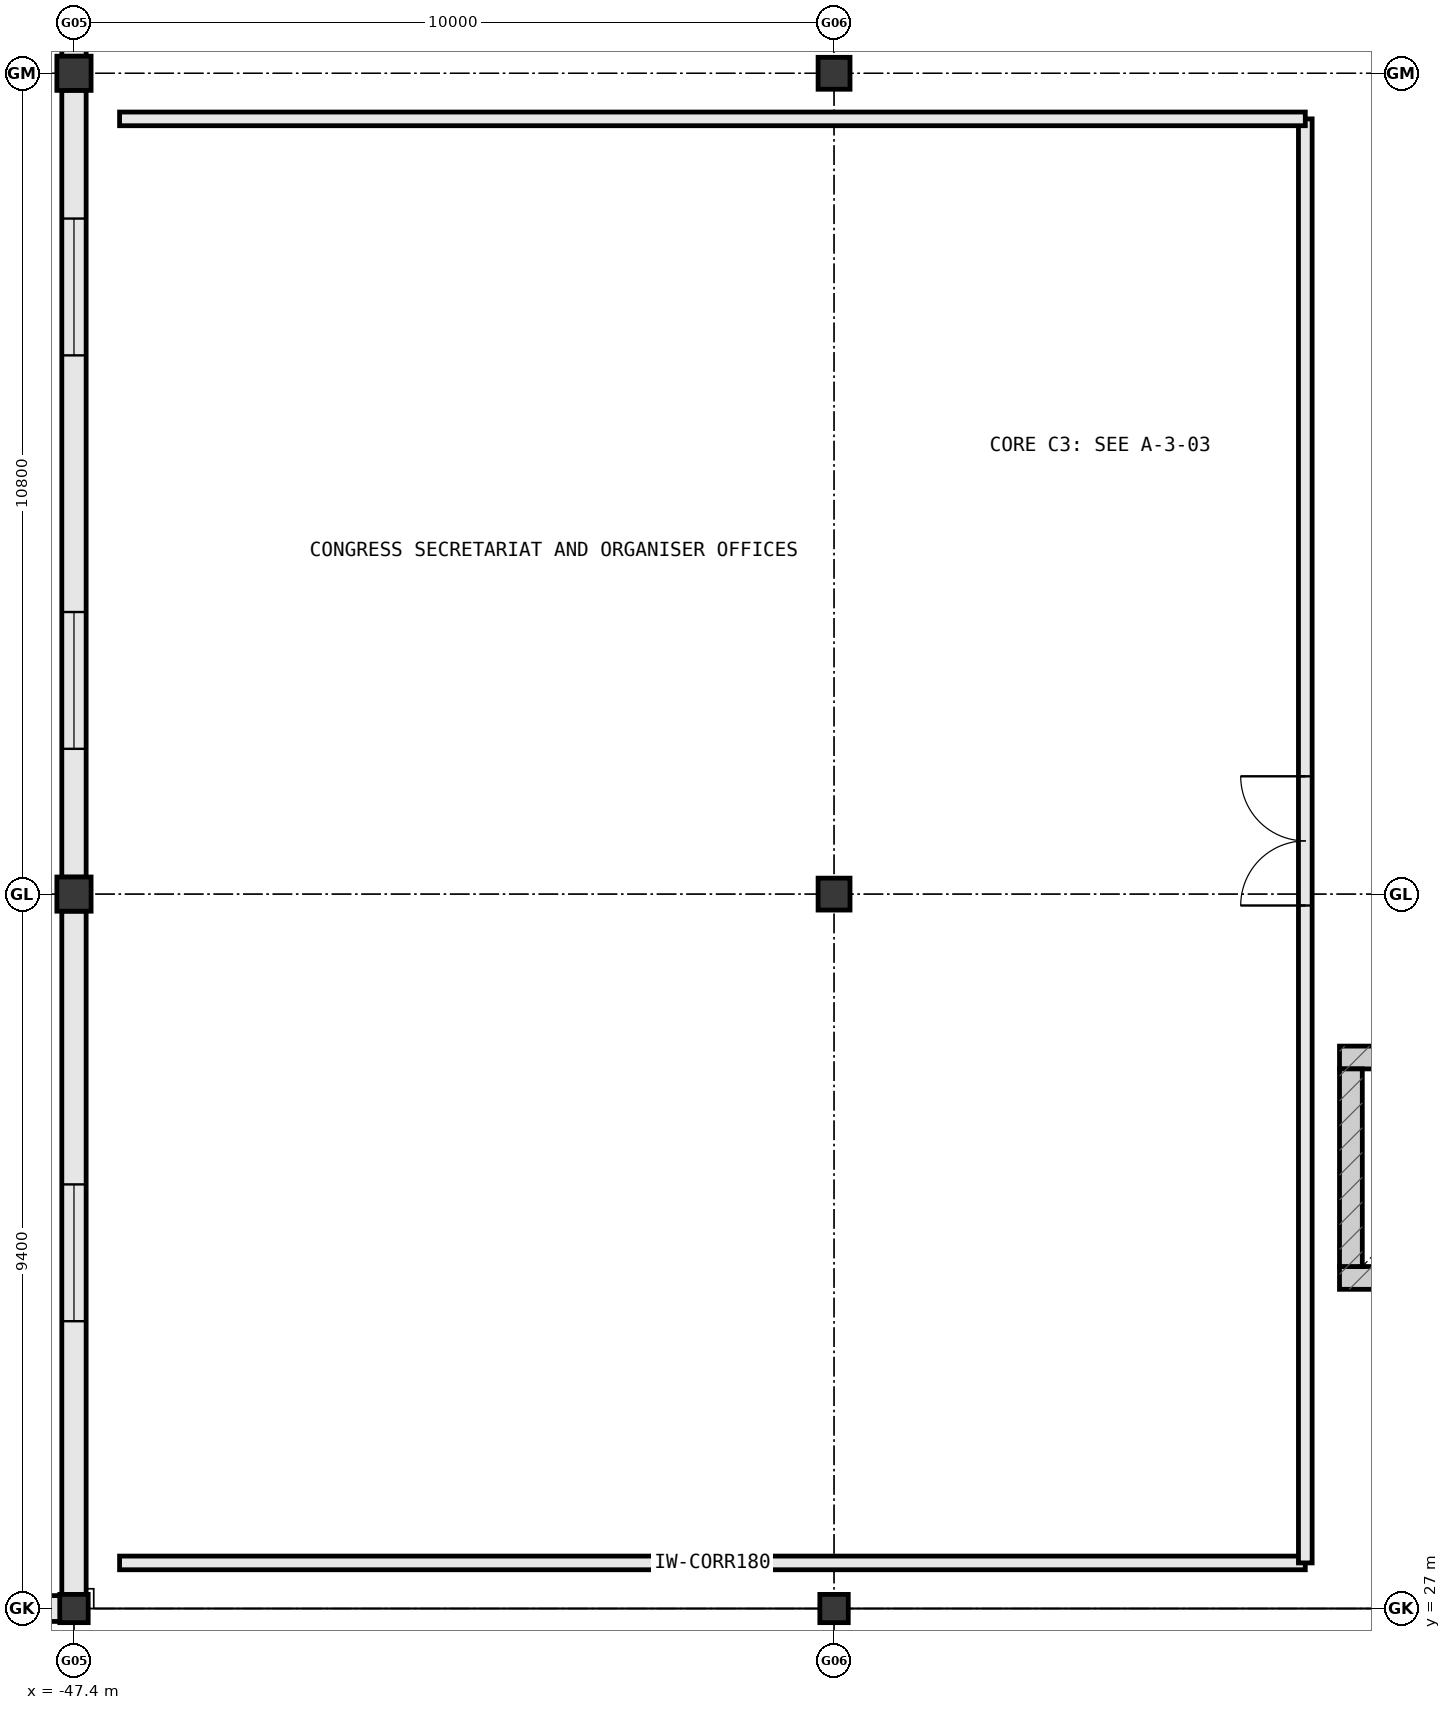
"""IFC4 building model, lengths in metres.
Left out: names, types, materials, properties, quantities, classifications, styles, units other than length and angle.
Written with IfcOpenShell. Run it as: python <this file> out.ifc"""

import sys

from ifc_helpers import new_model, si_unit, direction, frame, frame_2d, origin, origin_2d, place, context, subcontext, project, spatial, rectangle, i_section, extrude, element, fill, save


model = new_model("IFC4")
c1 = context("Model", 3, precision=1e-05, world=origin(), true_north=direction((0.0, 1.0)))
c2 = subcontext(c1, "Body", "Model", "MODEL_VIEW")
j1 = project(units=[si_unit("LENGTHUNIT", "METRE"), si_unit("PLANEANGLEUNIT", "RADIAN")], contexts=[c1])
p1 = place(None, origin())
s1 = spatial("IfcSite", under=j1, at=p1, CompositionType="ELEMENT")
p2 = place(p1, origin())
s2 = spatial("IfcBuilding", under=s1, at=p2, CompositionType="ELEMENT")
p3 = place(p2, frame((0.0, 0.0, 10.8)))
s3 = spatial("IfcBuildingStorey", under=s2, at=p3, CompositionType="ELEMENT", Elevation=10.8)
for number, where, z_axis, x_axis in (
    (1, (-47.4, 27.0, 0.0), (0.0, 0.0, 1.0), (1.0, 0.0, 0.0)),
    (2, (-37.4, 27.0, 0.0), (0.0, 0.0, 1.0), (1.0, 0.0, 0.0)),
):
    element("IfcColumn", number, at=place(p3, frame(where, z_axis=z_axis, x_axis=x_axis)), inside=s3, PredefinedType="COLUMN", context=c2, shape_type="SweptSolid", body=[
        extrude(i_section(OverallWidth=0.374, OverallDepth=0.372, WebThickness=0.016, FlangeThickness=0.026, at=origin_2d()), origin(), (0.0, 0.0, 1.0), 5.4),
    ])
for number, where, z_axis, x_axis in (
    (3, (-47.4, 36.4, 0.0), (0.0, 0.0, 1.0), (1.0, 0.0, 0.0)),
    (4, (-47.4, 47.2, 0.0), (0.0, 0.0, 1.0), (1.0, 0.0, 0.0)),
):
    element("IfcColumn", number, at=place(p3, frame(where, z_axis=z_axis, x_axis=x_axis)), inside=s3, PredefinedType="COLUMN", context=c2, shape_type="SweptSolid", body=[
        extrude(rectangle(XDim=0.45, YDim=0.45, at=origin_2d()), origin(), (0.0, 0.0, 1.0), 5.4),
    ])
for number, where, z_axis, x_axis in (
    (5, (-37.4, 36.4, 0.0), (0.0, 0.0, 1.0), (1.0, 0.0, 0.0)),
    (6, (-37.4, 47.2, 0.0), (0.0, 0.0, 1.0), (1.0, 0.0, 0.0)),
):
    element("IfcColumn", number, at=place(p3, frame(where, z_axis=z_axis, x_axis=x_axis)), inside=s3, PredefinedType="COLUMN", context=c2, shape_type="SweptSolid", body=[
        extrude(rectangle(XDim=0.42, YDim=0.42, at=origin_2d()), origin(), (0.0, 0.0, 1.0), 5.4),
    ])
p4 = place(p3, frame((-47.406, 27.0, 0.0), z_axis=(0.0, 0.0, 1.0), x_axis=(-1.0, 0.0, 0.0)))
e7 = element("IfcWall", 7, at=p4, inside=s3, PredefinedType="STANDARD", context=c2, shape_type="SweptSolid", body=[
    extrude(rectangle(XDim=9.988, YDim=0.34, at=frame_2d((4.994, 0.0))), origin(), (0.0, 0.0, 1.0), 4.094),
])
p5 = place(p4, frame((1.637, 0.0, 0.85)))
e8 = element("IfcOpeningElement", 8, at=p5, cuts=e7, PredefinedType="OPENING", context=c2, shape_type="SweptSolid", body=[
    extrude(rectangle(XDim=1.72, YDim=1.82, at=frame_2d((0.86, 0.91))), frame((0.0, 0.182, 0.0), z_axis=(0.0, -1.0, 0.0), x_axis=(1.0, 0.0, 0.0)), (0.0, 0.0, 1.0), 0.364),
])
p6 = place(p4, frame((6.631, 0.0, 0.85)))
e9 = element("IfcOpeningElement", 9, at=p6, cuts=e7, PredefinedType="OPENING", context=c2, shape_type="SweptSolid", body=[
    extrude(rectangle(XDim=1.72, YDim=1.82, at=frame_2d((0.86, 0.91))), frame((0.0, 0.182, 0.0), z_axis=(0.0, -1.0, 0.0), x_axis=(1.0, 0.0, 0.0)), (0.0, 0.0, 1.0), 0.364),
])
p7 = place(p3, frame((-47.4, 57.777, 0.0), z_axis=(0.0, 0.0, 1.0), x_axis=(0.0, -1.0, 0.0)))
e10 = element("IfcWall", 10, at=p7, inside=s3, PredefinedType="STANDARD", context=c2, shape_type="SweptSolid", body=[
    extrude(rectangle(XDim=10.354, YDim=0.32, at=frame_2d((5.177, 0.0))), origin(), (0.0, 0.0, 1.0), 4.102),
])
p8 = place(p7, frame((1.688, 0.0, 0.85)))
e11 = element("IfcOpeningElement", 11, at=p8, cuts=e10, PredefinedType="OPENING", context=c2, shape_type="SweptSolid", body=[
    extrude(rectangle(XDim=1.8, YDim=1.85, at=frame_2d((0.9, 0.925))), frame((0.0, 0.172, 0.0), z_axis=(0.0, -1.0, 0.0), x_axis=(1.0, 0.0, 0.0)), (0.0, 0.0, 1.0), 0.344),
])
p9 = place(p7, frame((6.865, 0.0, 0.85)))
e12 = element("IfcOpeningElement", 12, at=p9, cuts=e10, PredefinedType="OPENING", context=c2, shape_type="SweptSolid", body=[
    extrude(rectangle(XDim=1.8, YDim=1.85, at=frame_2d((0.9, 0.925))), frame((0.0, 0.172, 0.0), z_axis=(0.0, -1.0, 0.0), x_axis=(1.0, 0.0, 0.0)), (0.0, 0.0, 1.0), 0.344),
])
p10 = place(p3, frame((-47.4, 46.977, 0.0), z_axis=(0.0, 0.0, 1.0), x_axis=(0.0, -1.0, 0.0)))
e13 = element("IfcWall", 13, at=p10, inside=s3, PredefinedType="STANDARD", context=c2, shape_type="SweptSolid", body=[
    extrude(rectangle(XDim=10.354, YDim=0.32, at=frame_2d((5.177, 0.0))), origin(), (0.0, 0.0, 1.0), 4.102),
])
p11 = place(p10, frame((1.688, 0.0, 0.85)))
e14 = element("IfcOpeningElement", 14, at=p11, cuts=e13, PredefinedType="OPENING", context=c2, shape_type="SweptSolid", body=[
    extrude(rectangle(XDim=1.8, YDim=1.85, at=frame_2d((0.9, 0.925))), frame((0.0, 0.172, 0.0), z_axis=(0.0, -1.0, 0.0), x_axis=(1.0, 0.0, 0.0)), (0.0, 0.0, 1.0), 0.344),
])
p12 = place(p10, frame((6.865, 0.0, 0.85)))
e15 = element("IfcOpeningElement", 15, at=p12, cuts=e13, PredefinedType="OPENING", context=c2, shape_type="SweptSolid", body=[
    extrude(rectangle(XDim=1.8, YDim=1.85, at=frame_2d((0.9, 0.925))), frame((0.0, 0.172, 0.0), z_axis=(0.0, -1.0, 0.0), x_axis=(1.0, 0.0, 0.0)), (0.0, 0.0, 1.0), 0.344),
])
p13 = place(p3, frame((-47.4, 36.177, 0.0), z_axis=(0.0, 0.0, 1.0), x_axis=(0.0, -1.0, 0.0)))
e16 = element("IfcWall", 16, at=p13, inside=s3, PredefinedType="STANDARD", context=c2, shape_type="SweptSolid", body=[
    extrude(rectangle(XDim=8.993, YDim=0.32, at=frame_2d((4.497, 0.0))), origin(), (0.0, 0.0, 1.0), 4.178),
])
p14 = place(p13, frame((3.596, 0.0, 0.85)))
e17 = element("IfcOpeningElement", 17, at=p14, cuts=e16, PredefinedType="OPENING", context=c2, shape_type="SweptSolid", body=[
    extrude(rectangle(XDim=1.8, YDim=1.85, at=frame_2d((0.9, 0.925))), frame((0.0, 0.172, 0.0), z_axis=(0.0, -1.0, 0.0), x_axis=(1.0, 0.0, 0.0)), (0.0, 0.0, 1.0), 0.344),
])
p15 = place(p3, frame((-30.75, 31.35, 0.0), z_axis=(0.0, 0.0, 1.0), x_axis=(1.0, 0.0, 0.0)))
e18 = element("IfcWall", 18, at=p15, inside=s3, PredefinedType="SHEAR", context=c2, shape_type="SweptSolid", body=[
    extrude(rectangle(XDim=3.1, YDim=0.3, at=frame_2d((1.55, 0.0))), origin(), (0.0, 0.0, 1.0), 5.4),
])
p16 = place(p15, frame((0.95, 0.0, 0.0)))
e19 = element("IfcOpeningElement", 19, at=p16, cuts=e18, PredefinedType="OPENING", context=c2, shape_type="SweptSolid", body=[
    extrude(rectangle(XDim=1.2, YDim=2.2, at=frame_2d((0.6, 1.1))), frame((0.0, 0.162, 0.0), z_axis=(0.0, -1.0, 0.0), x_axis=(1.0, 0.0, 0.0)), (0.0, 0.0, 1.0), 0.324),
])
p17 = place(p3, frame((-27.65, 34.25, 0.0), z_axis=(0.0, 0.0, 1.0), x_axis=(-1.0, 0.0, 0.0)))
e20 = element("IfcWall", 20, at=p17, inside=s3, PredefinedType="SHEAR", context=c2, shape_type="SweptSolid", body=[
    extrude(rectangle(XDim=3.1, YDim=0.3, at=frame_2d((1.55, 0.0))), origin(), (0.0, 0.0, 1.0), 5.4),
])
p18 = place(p3, frame((-30.6, 34.1, 0.0), z_axis=(0.0, 0.0, 1.0), x_axis=(0.0, -1.0, 0.0)))
e21 = element("IfcWall", 21, at=p18, inside=s3, PredefinedType="SHEAR", context=c2, shape_type="SweptSolid", body=[
    extrude(rectangle(XDim=2.6, YDim=0.3, at=frame_2d((1.3, 0.0))), origin(), (0.0, 0.0, 1.0), 5.4),
])
p19 = place(p3, frame((-46.8, 27.6, 0.0), z_axis=(0.0, 0.0, 1.0), x_axis=(1.0, 0.0, 0.0)))
e22 = element("IfcWall", 22, at=p19, inside=s3, PredefinedType="PARTITIONING", context=c2, shape_type="SweptSolid", body=[
    extrude(rectangle(XDim=15.6, YDim=0.18, at=frame_2d((7.8, 0.0))), origin(), (0.0, 0.0, 1.0), 4.8),
])
p20 = place(p3, frame((-31.2, 27.6, 0.0), z_axis=(0.0, 0.0, 1.0), x_axis=(0.0, 1.0, 0.0)))
e23 = element("IfcWall", 23, at=p20, inside=s3, PredefinedType="PARTITIONING", context=c2, shape_type="SweptSolid", body=[
    extrude(rectangle(XDim=19.0, YDim=0.18, at=frame_2d((9.5, 0.0))), origin(), (0.0, 0.0, 1.0), 4.8),
])
p21 = place(p20, frame((8.65, 0.0, 0.0)))
e24 = element("IfcOpeningElement", 24, at=p21, cuts=e23, PredefinedType="OPENING", context=c2, shape_type="SweptSolid", body=[
    extrude(rectangle(XDim=1.7, YDim=2.3, at=frame_2d((0.85, 1.15))), frame((0.0, 0.102, 0.0), z_axis=(0.0, -1.0, 0.0), x_axis=(1.0, 0.0, 0.0)), (0.0, 0.0, 1.0), 0.204),
])
p22 = place(p3, frame((-31.2, 46.6, 0.0), z_axis=(0.0, 0.0, 1.0), x_axis=(-1.0, 0.0, 0.0)))
e25 = element("IfcWall", 25, at=p22, inside=s3, PredefinedType="PARTITIONING", context=c2, shape_type="SweptSolid", body=[
    extrude(rectangle(XDim=15.6, YDim=0.18, at=frame_2d((7.8, 0.0))), origin(), (0.0, 0.0, 1.0), 4.8),
])
p23 = place(p11, origin())
e26 = element("IfcWindow", 26, at=p23, inside=s3, PartitioningType="SINGLE_PANEL", PredefinedType="WINDOW", context=c2, shape_type="SweptSolid", body=[
    extrude(rectangle(XDim=1.8, YDim=1.85, at=frame_2d((0.9, 0.925))), frame((0.0, 0.03, 0.0), z_axis=(0.0, -1.0, 0.0), x_axis=(1.0, 0.0, 0.0)), (0.0, 0.0, 1.0), 0.06),
])
fill(e14, e26)
p24 = place(p12, origin())
e27 = element("IfcWindow", 27, at=p24, inside=s3, PartitioningType="SINGLE_PANEL", PredefinedType="WINDOW", context=c2, shape_type="SweptSolid", body=[
    extrude(rectangle(XDim=1.8, YDim=1.85, at=frame_2d((0.9, 0.925))), frame((0.0, 0.03, 0.0), z_axis=(0.0, -1.0, 0.0), x_axis=(1.0, 0.0, 0.0)), (0.0, 0.0, 1.0), 0.06),
])
fill(e15, e27)
p25 = place(p14, origin())
e28 = element("IfcWindow", 28, at=p25, inside=s3, PartitioningType="SINGLE_PANEL", PredefinedType="WINDOW", context=c2, shape_type="SweptSolid", body=[
    extrude(rectangle(XDim=1.8, YDim=1.85, at=frame_2d((0.9, 0.925))), frame((0.0, 0.03, 0.0), z_axis=(0.0, -1.0, 0.0), x_axis=(1.0, 0.0, 0.0)), (0.0, 0.0, 1.0), 0.06),
])
fill(e17, e28)
p26 = place(p21, origin())
e29 = element("IfcDoor", 29, at=p26, inside=s3, OperationType="DOUBLE_DOOR_SINGLE_SWING", PredefinedType="DOOR", context=c2, shape_type="SweptSolid", body=[
    extrude(rectangle(XDim=1.7, YDim=2.3, at=frame_2d((0.85, 1.15))), frame((0.0, 0.025, 0.0), z_axis=(0.0, -1.0, 0.0), x_axis=(1.0, 0.0, 0.0)), (0.0, 0.0, 1.0), 0.05),
])
fill(e24, e29)
save(model, sys.argv[1])
